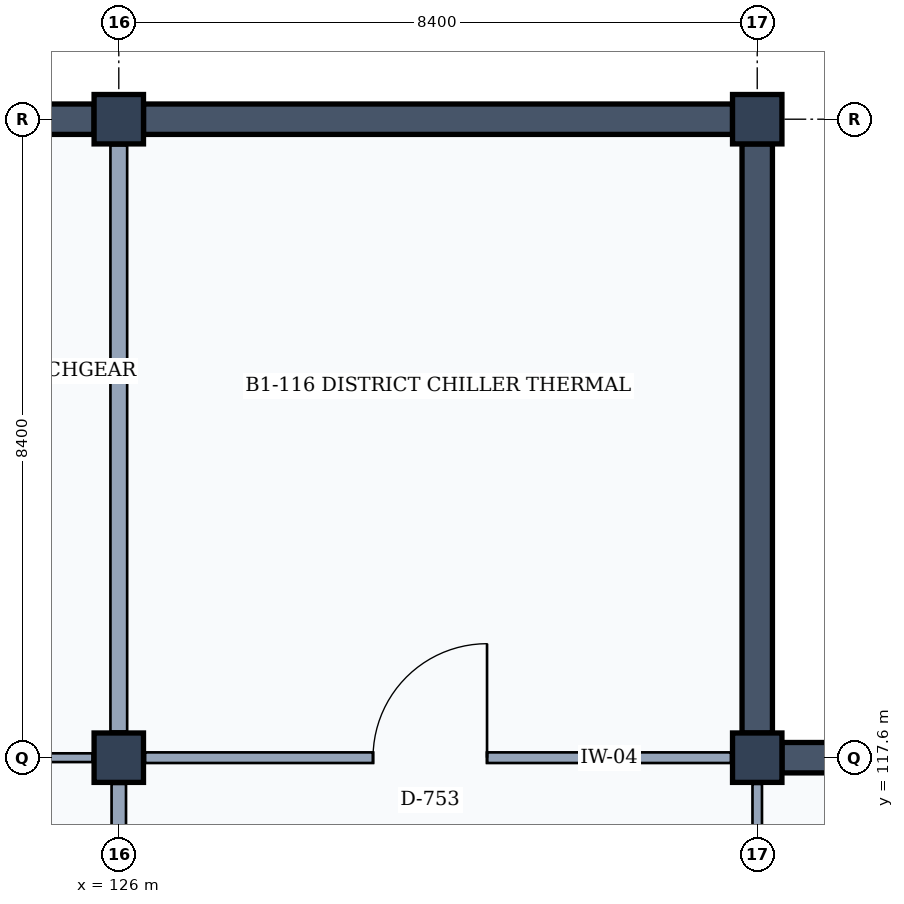
"""IFC4 building model, lengths in metres.
Left out: names, types, materials, properties, quantities, classifications, styles, units other than length and angle.
Written with IfcOpenShell. Run it as: python <this file> out.ifc"""

import sys

from ifc_helpers import new_model, si_unit, direction, frame, frame_2d, origin, origin_2d, place, context, subcontext, project, spatial, rectangle, extrude, element, fill, save


model = new_model("IFC4")
c1 = context("Model", 3, precision=1e-05, world=origin(), true_north=direction((0.0, 1.0)))
c2 = subcontext(c1, "Body", "Model", "MODEL_VIEW")
j1 = project(units=[si_unit("LENGTHUNIT", "METRE"), si_unit("PLANEANGLEUNIT", "RADIAN")], contexts=[c1])
p1 = place(None, origin())
s1 = spatial("IfcSite", under=j1, at=p1, CompositionType="ELEMENT")
p2 = place(p1, origin())
s2 = spatial("IfcBuilding", under=s1, at=p2, CompositionType="ELEMENT")
p3 = place(p2, frame((0.0, 0.0, -4.2)))
s3 = spatial("IfcBuildingStorey", under=s2, at=p3, CompositionType="ELEMENT", Elevation=-4.2)
for number, where, z_axis, x_axis in (
    (1, (126.0, 117.6, 0.0), (0.0, 0.0, 1.0), (1.0, 0.0, 0.0)),
    (2, (126.0, 126.0, 0.0), (0.0, 0.0, 1.0), (1.0, 0.0, 0.0)),
    (3, (134.4, 117.6, 0.0), (0.0, 0.0, 1.0), (1.0, 0.0, 0.0)),
    (4, (134.4, 126.0, 0.0), (0.0, 0.0, 1.0), (1.0, 0.0, 0.0)),
):
    element("IfcColumn", number, at=place(p3, frame(where, z_axis=z_axis, x_axis=x_axis)), inside=s3, PredefinedType="COLUMN", context=c2, shape_type="SweptSolid", body=[
        extrude(rectangle(XDim=0.65, YDim=0.65, at=origin_2d()), origin(), (0.0, 0.0, 1.0), 4.2),
    ])
for number, where, z_axis, x_axis in (
    (5, (117.925, 126.0, 0.0), (0.0, 0.0, 1.0), (1.0, 0.0, 0.0)),
    (6, (126.325, 126.0, 0.0), (0.0, 0.0, 1.0), (1.0, 0.0, 0.0)),
    (7, (134.4, 125.675, 0.0), (0.0, 0.0, 1.0), (0.0, -1.0, 0.0)),
):
    element("IfcWall", number, at=place(p3, frame(where, z_axis=z_axis, x_axis=x_axis)), inside=s3, PredefinedType="STANDARD", context=c2, shape_type="SweptSolid", body=[
        extrude(rectangle(XDim=7.75, YDim=0.4, at=frame_2d((3.875, 0.0))), origin(), (0.0, 0.0, 1.0), 3.88),
    ])
p4 = place(p3, frame((134.725, 117.6, 0.0), z_axis=(0.0, 0.0, 1.0), x_axis=(1.0, 0.0, 0.0)))
e8 = element("IfcWall", 8, at=p4, inside=s3, PredefinedType="STANDARD", context=c2, shape_type="SweptSolid", body=[
    extrude(rectangle(XDim=7.7, YDim=0.4, at=frame_2d((3.85, 0.0))), origin(), (0.0, 0.0, 1.0), 3.88),
])
p5 = place(p3, frame((126.0, 109.545, 0.0), z_axis=(0.0, 0.0, 1.0), x_axis=(0.0, 1.0, 0.0)))
e9 = element("IfcWall", 9, at=p5, inside=s3, PredefinedType="PARTITIONING", context=c2, shape_type="SweptSolid", body=[
    extrude(rectangle(XDim=7.71, YDim=0.19, at=frame_2d((3.855, 0.0))), origin(), (0.0, 0.0, 1.0), 3.23),
])
p6 = place(p3, frame((117.945, 117.6, 0.0), z_axis=(0.0, 0.0, 1.0), x_axis=(1.0, 0.0, 0.0)))
e10 = element("IfcWall", 10, at=p6, inside=s3, PredefinedType="PARTITIONING", context=c2, shape_type="SweptSolid", body=[
    extrude(rectangle(XDim=7.71, YDim=0.115, at=frame_2d((3.855, 0.0))), origin(), (0.0, 0.0, 1.0), 2.93),
])
p7 = place(p6, frame((2.8, 0.0, 0.0)))
e11 = element("IfcOpeningElement", 11, at=p7, cuts=e10, PredefinedType="OPENING", context=c2, shape_type="SweptSolid", body=[
    extrude(rectangle(XDim=1.9, YDim=2.4, at=frame_2d((0.95, 1.2))), frame((0.0, 0.067, 0.0), z_axis=(0.0, -1.0, 0.0), x_axis=(1.0, 0.0, 0.0)), (0.0, 0.0, 1.0), 0.135),
])
p8 = place(p3, frame((126.0, 117.945, 0.0), z_axis=(0.0, 0.0, 1.0), x_axis=(0.0, 1.0, 0.0)))
e12 = element("IfcWall", 12, at=p8, inside=s3, PredefinedType="PARTITIONING", context=c2, shape_type="SweptSolid", body=[
    extrude(rectangle(XDim=7.71, YDim=0.22, at=frame_2d((3.855, 0.0))), origin(), (0.0, 0.0, 1.0), 3.23),
])
p9 = place(p3, frame((134.4, 109.545, 0.0), z_axis=(0.0, 0.0, 1.0), x_axis=(0.0, 1.0, 0.0)))
e13 = element("IfcWall", 13, at=p9, inside=s3, PredefinedType="PARTITIONING", context=c2, shape_type="SweptSolid", body=[
    extrude(rectangle(XDim=7.71, YDim=0.125, at=frame_2d((3.855, 0.0))), origin(), (0.0, 0.0, 1.0), 3.08),
])
p10 = place(p3, frame((126.345, 117.6, 0.0), z_axis=(0.0, 0.0, 1.0), x_axis=(1.0, 0.0, 0.0)))
e14 = element("IfcWall", 14, at=p10, inside=s3, PredefinedType="PARTITIONING", context=c2, shape_type="SweptSolid", body=[
    extrude(rectangle(XDim=7.71, YDim=0.14, at=frame_2d((3.855, 0.0))), origin(), (0.0, 0.0, 1.0), 2.93),
])
p11 = place(p10, frame((3.0, 0.0, 0.0)))
e15 = element("IfcOpeningElement", 15, at=p11, cuts=e14, PredefinedType="OPENING", context=c2, shape_type="SweptSolid", body=[
    extrude(rectangle(XDim=1.5, YDim=2.3, at=frame_2d((0.75, 1.15))), frame((0.0, 0.08, 0.0), z_axis=(0.0, -1.0, 0.0), x_axis=(1.0, 0.0, 0.0)), (0.0, 0.0, 1.0), 0.16),
])
p12 = place(p11, origin())
e16 = element("IfcDoor", 16, at=p12, inside=s3, OperationType="SINGLE_SWING_RIGHT", PredefinedType="DOOR", context=c2, shape_type="SweptSolid", body=[
    extrude(rectangle(XDim=1.5, YDim=2.3, at=frame_2d((0.75, 1.15))), frame((0.0, 0.025, 0.0), z_axis=(0.0, -1.0, 0.0), x_axis=(1.0, 0.0, 0.0)), (0.0, 0.0, 1.0), 0.05),
])
fill(e15, e16)
save(model, sys.argv[1])
